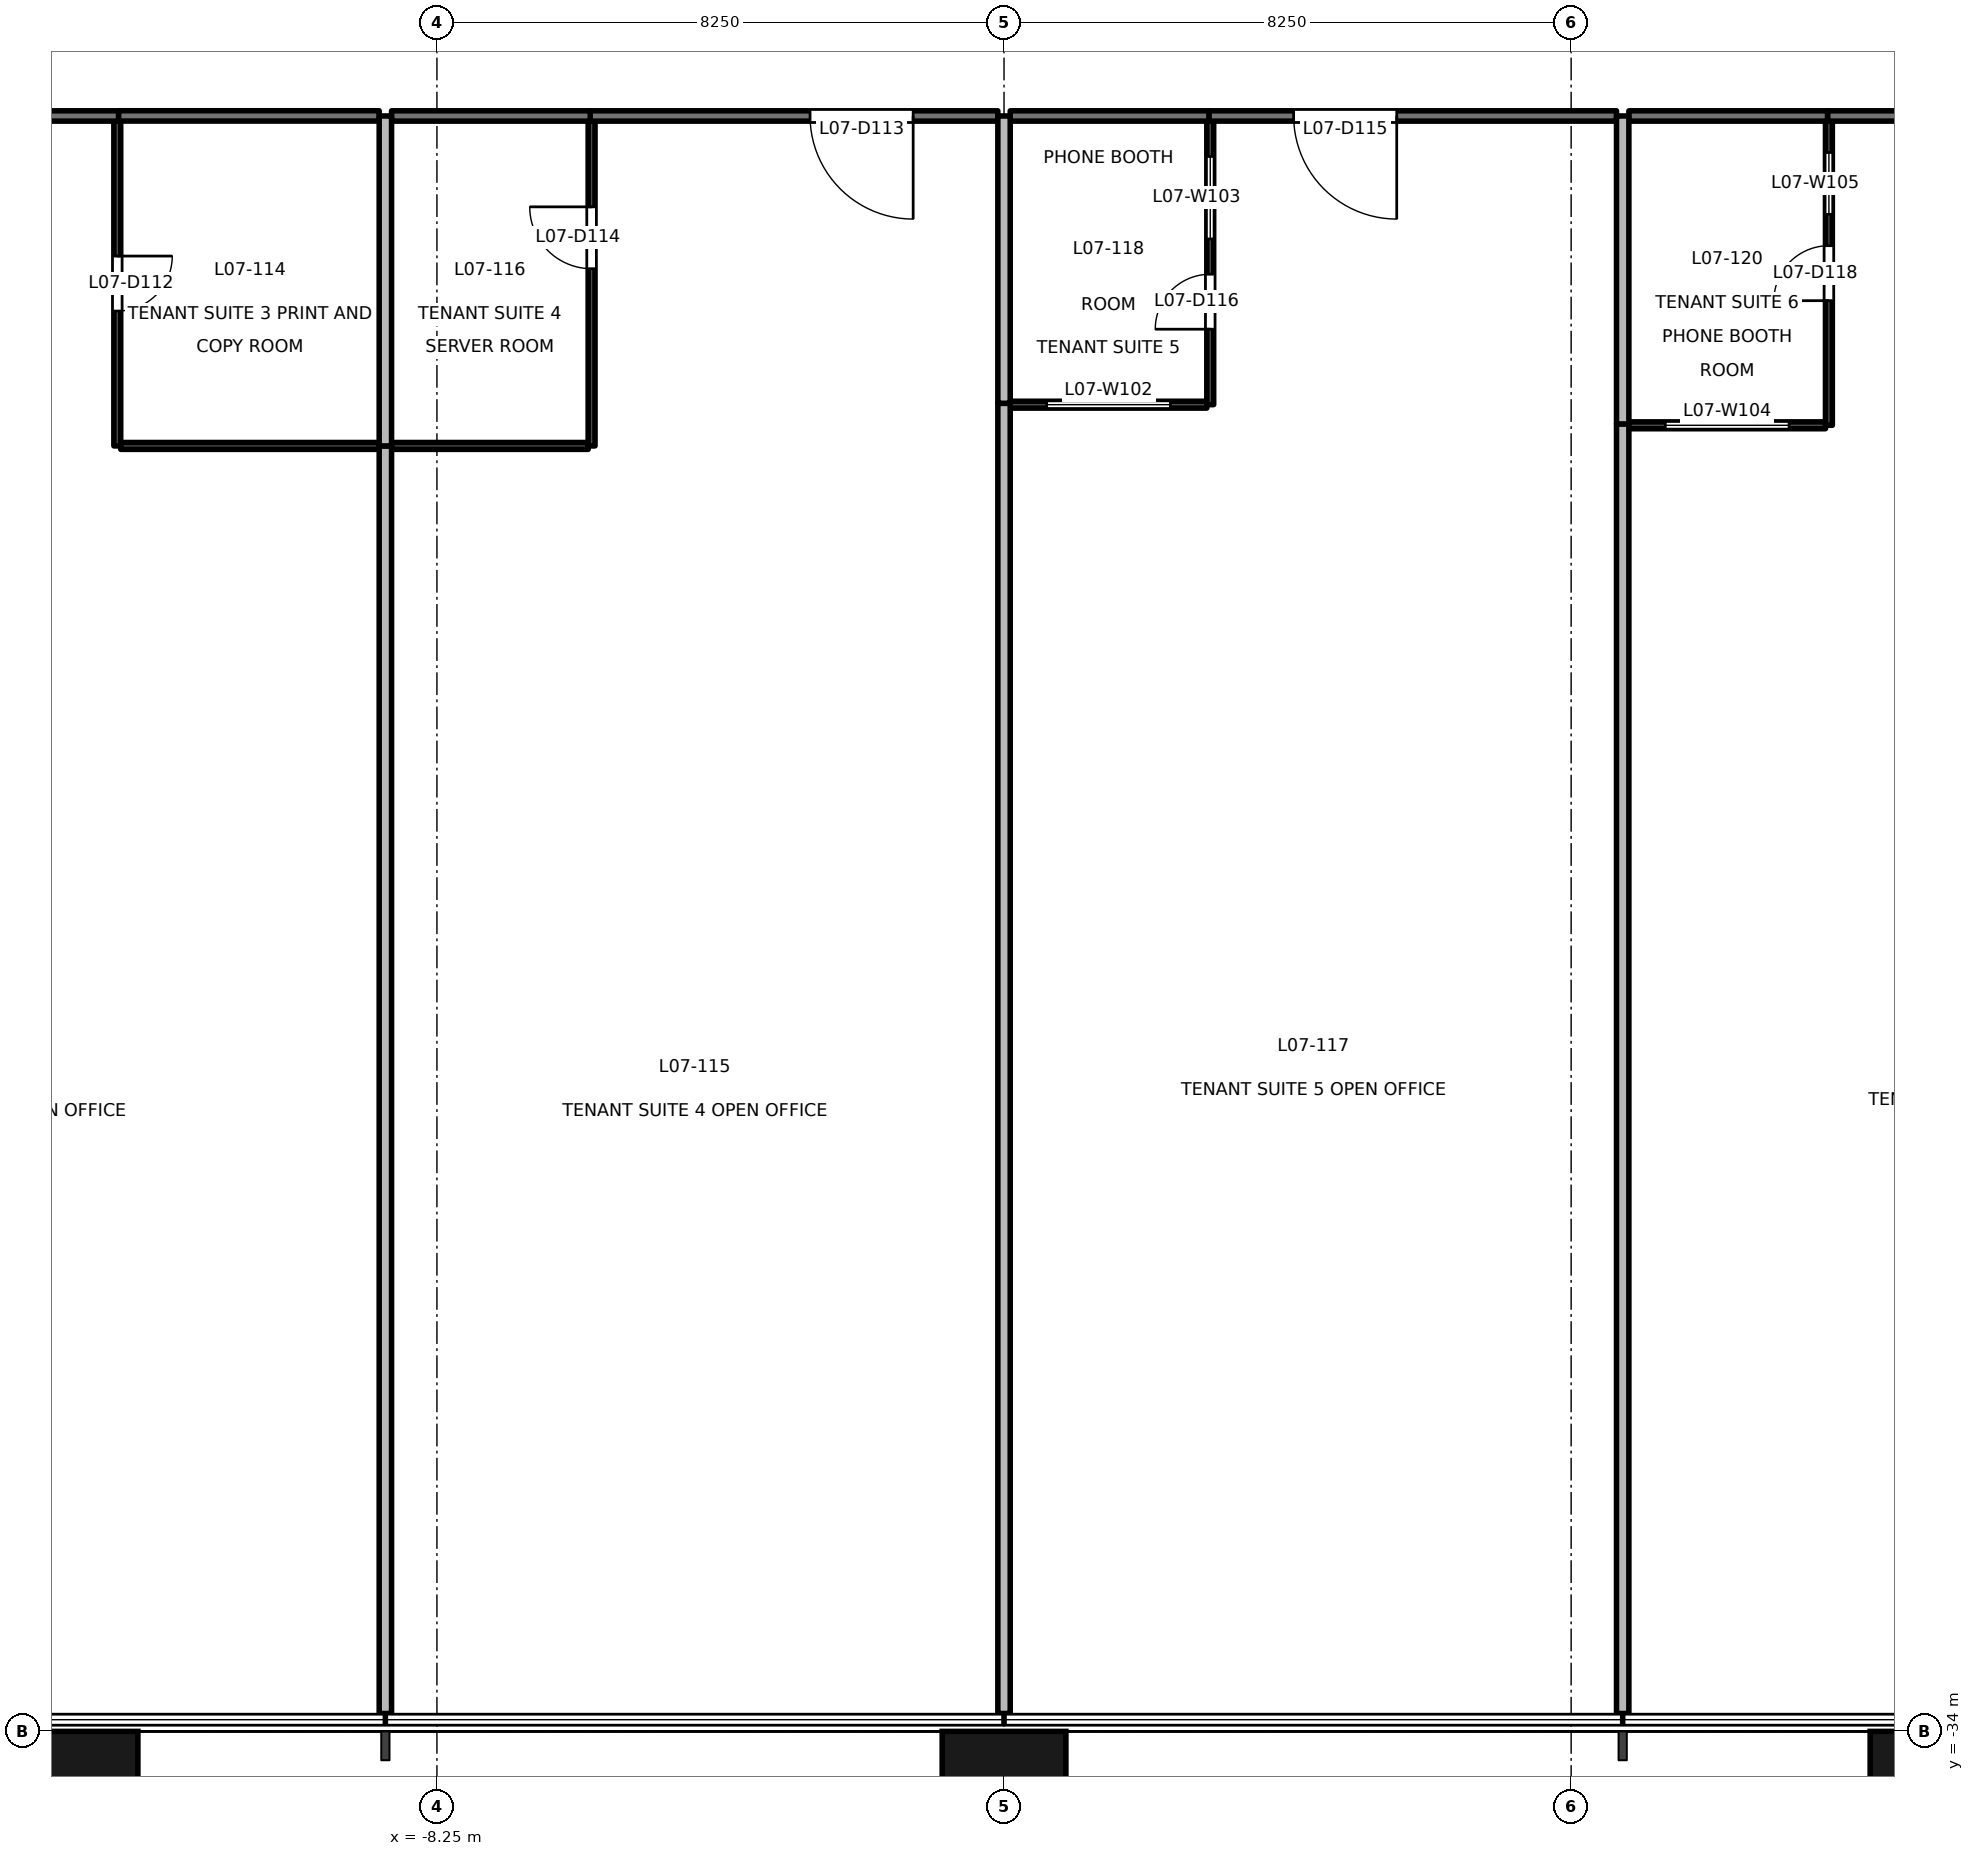
"""IFC4 building model, lengths in metres.
Left out: names, types, materials, properties, quantities, classifications, styles, units other than length and angle.
Written with IfcOpenShell. Run it as: python <this file> out.ifc"""

import sys

from ifc_helpers import new_model, si_unit, direction, frame, frame_2d, origin, origin_2d, place, context, subcontext, project, spatial, rectangle, extrude, element, fill, save


model = new_model("IFC4")
c1 = context("Model", 3, precision=1e-05, world=origin(), true_north=direction((0.0, 1.0)))
c2 = subcontext(c1, "Body", "Model", "MODEL_VIEW")
j1 = project(units=[si_unit("LENGTHUNIT", "METRE"), si_unit("PLANEANGLEUNIT", "RADIAN")], contexts=[c1])
p1 = place(None, origin())
s1 = spatial("IfcSite", under=j1, at=p1, CompositionType="ELEMENT")
p2 = place(p1, origin())
s2 = spatial("IfcBuilding", under=s1, at=p2, CompositionType="ELEMENT")
p3 = place(p2, frame((0.0, 0.0, 36.5)))
s3 = spatial("IfcBuildingStorey", under=s2, at=p3, CompositionType="ELEMENT", Elevation=36.5)
for number, where, z_axis, x_axis in (
    (1, (-13.5, -34.9, -0.2), (0.0, 0.0, 1.0), (1.0, 0.0, 0.0)),
    (2, (0.0, -34.9, -0.2), (0.0, 0.0, 1.0), (1.0, 0.0, 0.0)),
    (3, (13.5, -34.9, -0.2), (0.0, 0.0, 1.0), (1.0, 0.0, 0.0)),
):
    element("IfcColumn", number, at=place(p3, frame(where, z_axis=z_axis, x_axis=x_axis)), inside=s3, PredefinedType="COLUMN", context=c2, shape_type="SweptSolid", body=[
        extrude(rectangle(XDim=1.8, YDim=1.8, at=origin_2d()), origin(), (0.0, 0.0, 1.0), 4.1),
    ])
p4 = place(p3, frame((-12.88, -10.5, 0.0), z_axis=(0.0, 0.0, 1.0), x_axis=(-1.0, 0.0, 0.0)))
e4 = element("IfcWall", 4, at=p4, inside=s3, PredefinedType="PARTITIONING", context=c2, shape_type="SweptSolid", body=[
    extrude(rectangle(XDim=4.54, YDim=0.15, at=frame_2d((2.27, 0.0))), origin(), (0.0, 0.0, 1.0), 2.9),
])
p5 = place(p4, frame((1.93, 0.0, 0.0)))
e5 = element("IfcOpeningElement", 5, at=p5, cuts=e4, PredefinedType="OPENING", context=c2, shape_type="SweptSolid", body=[
    extrude(rectangle(XDim=1.8, YDim=2.1, at=frame_2d((0.9, 1.05))), frame((0.0, 0.085, 0.0), z_axis=(0.0, -1.0, 0.0), x_axis=(1.0, 0.0, 0.0)), (0.0, 0.0, 1.0), 0.171),
])
p6 = place(p3, frame((-9.09, -10.499, 0.0), z_axis=(0.0, 0.0, 1.0), x_axis=(-1.0, 0.0, 0.0)))
e6 = element("IfcWall", 6, at=p6, inside=s3, PredefinedType="PARTITIONING", context=c2, shape_type="SweptSolid", body=[
    extrude(rectangle(XDim=3.79, YDim=0.15, at=frame_2d((1.895, 0.0))), origin(), (0.0, 0.0, 1.0), 2.9),
])
p7 = place(p3, frame((-0.09, -10.5, 0.0), z_axis=(0.0, 0.0, 1.0), x_axis=(-1.0, 0.0, 0.0)))
e7 = element("IfcWall", 7, at=p7, inside=s3, PredefinedType="PARTITIONING", context=c2, shape_type="SweptSolid", body=[
    extrude(rectangle(XDim=5.93, YDim=0.15, at=frame_2d((2.965, 0.0))), origin(), (0.0, 0.0, 1.0), 2.9),
])
p8 = place(p7, frame((1.232, 0.0, 0.0)))
e8 = element("IfcOpeningElement", 8, at=p8, cuts=e7, PredefinedType="OPENING", context=c2, shape_type="SweptSolid", body=[
    extrude(rectangle(XDim=1.5, YDim=2.1, at=frame_2d((0.75, 1.05))), frame((0.0, 0.085, 0.0), z_axis=(0.0, -1.0, 0.0), x_axis=(1.0, 0.0, 0.0)), (0.0, 0.0, 1.0), 0.171),
])
p9 = place(p3, frame((-6.02, -10.5, 0.0), z_axis=(0.0, 0.0, 1.0), x_axis=(-1.0, 0.0, 0.0)))
e9 = element("IfcWall", 9, at=p9, inside=s3, PredefinedType="PARTITIONING", context=c2, shape_type="SweptSolid", body=[
    extrude(rectangle(XDim=2.89, YDim=0.15, at=frame_2d((1.445, 0.0))), origin(), (0.0, 0.0, 1.0), 2.9),
])
p10 = place(p3, frame((8.91, -10.5, 0.0), z_axis=(0.0, 0.0, 1.0), x_axis=(-1.0, 0.0, 0.0)))
e10 = element("IfcWall", 10, at=p10, inside=s3, PredefinedType="PARTITIONING", context=c2, shape_type="SweptSolid", body=[
    extrude(rectangle(XDim=5.93, YDim=0.15, at=frame_2d((2.965, 0.0))), origin(), (0.0, 0.0, 1.0), 2.9),
])
p11 = place(p10, frame((3.197, 0.0, 0.0)))
e11 = element("IfcOpeningElement", 11, at=p11, cuts=e10, PredefinedType="OPENING", context=c2, shape_type="SweptSolid", body=[
    extrude(rectangle(XDim=1.5, YDim=2.1, at=frame_2d((0.75, 1.05))), frame((0.0, 0.085, 0.0), z_axis=(0.0, -1.0, 0.0), x_axis=(1.0, 0.0, 0.0)), (0.0, 0.0, 1.0), 0.171),
])
p12 = place(p3, frame((2.98, -10.5, 0.0), z_axis=(0.0, 0.0, 1.0), x_axis=(-1.0, 0.0, 0.0)))
e12 = element("IfcWall", 12, at=p12, inside=s3, PredefinedType="PARTITIONING", context=c2, shape_type="SweptSolid", body=[
    extrude(rectangle(XDim=2.89, YDim=0.15, at=frame_2d((1.445, 0.0))), origin(), (0.0, 0.0, 1.0), 2.9),
])
p13 = place(p3, frame((15.88, -10.5, 0.0), z_axis=(0.0, 0.0, 1.0), x_axis=(-1.0, 0.0, 0.0)))
e13 = element("IfcWall", 13, at=p13, inside=s3, PredefinedType="PARTITIONING", context=c2, shape_type="SweptSolid", body=[
    extrude(rectangle(XDim=3.9, YDim=0.15, at=frame_2d((1.95, 0.0))), origin(), (0.0, 0.0, 1.0), 2.9),
])
p14 = place(p13, frame((1.05, 0.0, 0.0)))
e14 = element("IfcOpeningElement", 14, at=p14, cuts=e13, PredefinedType="OPENING", context=c2, shape_type="SweptSolid", body=[
    extrude(rectangle(XDim=1.8, YDim=2.1, at=frame_2d((0.9, 1.05))), frame((0.0, 0.085, 0.0), z_axis=(0.0, -1.0, 0.0), x_axis=(1.0, 0.0, 0.0)), (0.0, 0.0, 1.0), 0.171),
])
p15 = place(p3, frame((11.98, -10.5, 0.0), z_axis=(0.0, 0.0, 1.0), x_axis=(-1.0, 0.0, 0.0)))
e15 = element("IfcWall", 15, at=p15, inside=s3, PredefinedType="PARTITIONING", context=c2, shape_type="SweptSolid", body=[
    extrude(rectangle(XDim=2.89, YDim=0.15, at=frame_2d((1.445, 0.0))), origin(), (0.0, 0.0, 1.0), 2.9),
])
p16 = place(p3, frame((-12.9, -10.575, 0.0), z_axis=(0.0, 0.0, 1.0), x_axis=(0.0, -1.0, 0.0)))
e16 = element("IfcWall", 16, at=p16, inside=s3, PredefinedType="PARTITIONING", context=c2, shape_type="SweptSolid", body=[
    extrude(rectangle(XDim=4.725, YDim=0.1, at=frame_2d((2.363, 0.0))), origin(), (0.0, 0.0, 1.0), 3.9),
])
p17 = place(p16, frame((1.963, 0.0, 0.0)))
e17 = element("IfcOpeningElement", 17, at=p17, cuts=e16, PredefinedType="OPENING", context=c2, shape_type="SweptSolid", body=[
    extrude(rectangle(XDim=0.8, YDim=2.1, at=frame_2d((0.4, 1.05))), frame((0.0, 0.061, 0.0), z_axis=(0.0, -1.0, 0.0), x_axis=(1.0, 0.0, 0.0)), (0.0, 0.0, 1.0), 0.121),
])
p18 = place(p3, frame((-12.85, -15.3, 0.0), z_axis=(0.0, 0.0, 1.0), x_axis=(1.0, 0.0, 0.0)))
e18 = element("IfcWall", 18, at=p18, inside=s3, PredefinedType="PARTITIONING", context=c2, shape_type="SweptSolid", body=[
    extrude(rectangle(XDim=3.76, YDim=0.1, at=frame_2d((1.88, 0.0))), origin(), (0.0, 0.0, 1.0), 2.9),
])
p19 = place(p3, frame((-9.0, -15.3, 0.0), z_axis=(0.0, 0.0, 1.0), x_axis=(0.0, -1.0, 0.0)))
e19 = element("IfcWall", 19, at=p19, inside=s3, PredefinedType="PARTITIONING", context=c2, shape_type="SweptSolid", body=[
    extrude(rectangle(XDim=18.44, YDim=0.18, at=frame_2d((9.22, 0.0))), origin(), (0.0, 0.0, 1.0), 2.9),
])
p20 = place(p3, frame((-9.0, -10.5, 0.0), z_axis=(0.0, 0.0, 1.0), x_axis=(0.0, -1.0, 0.0)))
e20 = element("IfcWall", 20, at=p20, inside=s3, PredefinedType="PARTITIONING", context=c2, shape_type="SweptSolid", body=[
    extrude(rectangle(XDim=4.8, YDim=0.18, at=frame_2d((2.4, 0.0))), origin(), (0.0, 0.0, 1.0), 2.9),
])
p21 = place(p3, frame((-8.91, -15.3, 0.0), z_axis=(0.0, 0.0, 1.0), x_axis=(1.0, 0.0, 0.0)))
e21 = element("IfcWall", 21, at=p21, inside=s3, PredefinedType="PARTITIONING", context=c2, shape_type="SweptSolid", body=[
    extrude(rectangle(XDim=2.86, YDim=0.1, at=frame_2d((1.43, 0.0))), origin(), (0.0, 0.0, 1.0), 2.9),
])
p22 = place(p3, frame((-6.0, -15.3, 0.0), z_axis=(0.0, 0.0, 1.0), x_axis=(0.0, 1.0, 0.0)))
e22 = element("IfcWall", 22, at=p22, inside=s3, PredefinedType="PARTITIONING", context=c2, shape_type="SweptSolid", body=[
    extrude(rectangle(XDim=4.725, YDim=0.1, at=frame_2d((2.363, 0.0))), origin(), (0.0, 0.0, 1.0), 3.9),
])
p23 = place(p22, frame((2.578, 0.0, 0.0)))
e23 = element("IfcOpeningElement", 23, at=p23, cuts=e22, PredefinedType="OPENING", context=c2, shape_type="SweptSolid", body=[
    extrude(rectangle(XDim=0.9, YDim=2.1, at=frame_2d((0.45, 1.05))), frame((0.0, 0.061, 0.0), z_axis=(0.0, -1.0, 0.0), x_axis=(1.0, 0.0, 0.0)), (0.0, 0.0, 1.0), 0.121),
])
p24 = place(p3, frame((0.0, -14.68, 0.0), z_axis=(0.0, 0.0, 1.0), x_axis=(0.0, -1.0, 0.0)))
e24 = element("IfcWall", 24, at=p24, inside=s3, PredefinedType="PARTITIONING", context=c2, shape_type="SweptSolid", body=[
    extrude(rectangle(XDim=19.06, YDim=0.18, at=frame_2d((9.53, 0.0))), origin(), (0.0, 0.0, 1.0), 2.9),
])
p25 = place(p3, frame((0.0, -10.5, 0.0), z_axis=(0.0, 0.0, 1.0), x_axis=(0.0, -1.0, 0.0)))
e25 = element("IfcWall", 25, at=p25, inside=s3, PredefinedType="PARTITIONING", context=c2, shape_type="SweptSolid", body=[
    extrude(rectangle(XDim=4.18, YDim=0.18, at=frame_2d((2.09, 0.0))), origin(), (0.0, 0.0, 1.0), 2.9),
])
p26 = place(p3, frame((0.09, -14.7, 0.0), z_axis=(0.0, 0.0, 1.0), x_axis=(1.0, 0.0, 0.0)))
e26 = element("IfcWall", 26, at=p26, inside=s3, PredefinedType="PARTITIONING", context=c2, shape_type="SweptSolid", body=[
    extrude(rectangle(XDim=2.86, YDim=0.1, at=frame_2d((1.43, 0.0))), origin(), (0.0, 0.0, 1.0), 2.9),
])
p27 = place(p26, frame((0.53, 0.0, 0.9)))
e27 = element("IfcOpeningElement", 27, at=p27, cuts=e26, PredefinedType="OPENING", context=c2, shape_type="SweptSolid", body=[
    extrude(rectangle(XDim=1.8, YDim=1.2, at=frame_2d((0.9, 0.6))), frame((0.0, 0.061, 0.0), z_axis=(0.0, -1.0, 0.0), x_axis=(1.0, 0.0, 0.0)), (0.0, 0.0, 1.0), 0.121),
])
p28 = place(p3, frame((3.0, -14.7, 0.0), z_axis=(0.0, 0.0, 1.0), x_axis=(0.0, 1.0, 0.0)))
e28 = element("IfcWall", 28, at=p28, inside=s3, PredefinedType="PARTITIONING", context=c2, shape_type="SweptSolid", body=[
    extrude(rectangle(XDim=4.125, YDim=0.1, at=frame_2d((2.062, 0.0))), origin(), (0.0, 0.0, 1.0), 3.9),
])
p29 = place(p28, frame((1.098, 0.0, 0.0)))
e29 = element("IfcOpeningElement", 29, at=p29, cuts=e28, PredefinedType="OPENING", context=c2, shape_type="SweptSolid", body=[
    extrude(rectangle(XDim=0.8, YDim=2.1, at=frame_2d((0.4, 1.05))), frame((0.0, 0.061, 0.0), z_axis=(0.0, -1.0, 0.0), x_axis=(1.0, 0.0, 0.0)), (0.0, 0.0, 1.0), 0.121),
])
p30 = place(p28, frame((2.411, 0.0, 0.9)))
e30 = element("IfcOpeningElement", 30, at=p30, cuts=e28, PredefinedType="OPENING", context=c2, shape_type="SweptSolid", body=[
    extrude(rectangle(XDim=1.2, YDim=1.2, at=frame_2d((0.6, 0.6))), frame((0.0, 0.061, 0.0), z_axis=(0.0, -1.0, 0.0), x_axis=(1.0, 0.0, 0.0)), (0.0, 0.0, 1.0), 0.121),
])
p31 = place(p3, frame((9.0, -14.98, 0.0), z_axis=(0.0, 0.0, 1.0), x_axis=(0.0, -1.0, 0.0)))
e31 = element("IfcWall", 31, at=p31, inside=s3, PredefinedType="PARTITIONING", context=c2, shape_type="SweptSolid", body=[
    extrude(rectangle(XDim=18.76, YDim=0.18, at=frame_2d((9.38, 0.0))), origin(), (0.0, 0.0, 1.0), 2.9),
])
p32 = place(p3, frame((9.0, -10.5, 0.0), z_axis=(0.0, 0.0, 1.0), x_axis=(0.0, -1.0, 0.0)))
e32 = element("IfcWall", 32, at=p32, inside=s3, PredefinedType="PARTITIONING", context=c2, shape_type="SweptSolid", body=[
    extrude(rectangle(XDim=4.48, YDim=0.18, at=frame_2d((2.24, 0.0))), origin(), (0.0, 0.0, 1.0), 2.9),
])
p33 = place(p3, frame((9.09, -15.0, 0.0), z_axis=(0.0, 0.0, 1.0), x_axis=(1.0, 0.0, 0.0)))
e33 = element("IfcWall", 33, at=p33, inside=s3, PredefinedType="PARTITIONING", context=c2, shape_type="SweptSolid", body=[
    extrude(rectangle(XDim=2.86, YDim=0.1, at=frame_2d((1.43, 0.0))), origin(), (0.0, 0.0, 1.0), 2.9),
])
p34 = place(p33, frame((0.53, 0.0, 0.9)))
e34 = element("IfcOpeningElement", 34, at=p34, cuts=e33, PredefinedType="OPENING", context=c2, shape_type="SweptSolid", body=[
    extrude(rectangle(XDim=1.8, YDim=1.2, at=frame_2d((0.9, 0.6))), frame((0.0, 0.061, 0.0), z_axis=(0.0, -1.0, 0.0), x_axis=(1.0, 0.0, 0.0)), (0.0, 0.0, 1.0), 0.121),
])
p35 = place(p3, frame((12.0, -15.0, 0.0), z_axis=(0.0, 0.0, 1.0), x_axis=(0.0, 1.0, 0.0)))
e35 = element("IfcWall", 35, at=p35, inside=s3, PredefinedType="PARTITIONING", context=c2, shape_type="SweptSolid", body=[
    extrude(rectangle(XDim=4.425, YDim=0.1, at=frame_2d((2.212, 0.0))), origin(), (0.0, 0.0, 1.0), 3.9),
])
p36 = place(p35, frame((1.813, 0.0, 0.0)))
e36 = element("IfcOpeningElement", 36, at=p36, cuts=e35, PredefinedType="OPENING", context=c2, shape_type="SweptSolid", body=[
    extrude(rectangle(XDim=0.8, YDim=2.1, at=frame_2d((0.4, 1.05))), frame((0.0, 0.061, 0.0), z_axis=(0.0, -1.0, 0.0), x_axis=(1.0, 0.0, 0.0)), (0.0, 0.0, 1.0), 0.121),
])
p37 = place(p35, frame((3.069, 0.0, 0.9)))
e37 = element("IfcOpeningElement", 37, at=p37, cuts=e35, PredefinedType="OPENING", context=c2, shape_type="SweptSolid", body=[
    extrude(rectangle(XDim=0.9, YDim=1.2, at=frame_2d((0.45, 0.6))), frame((0.0, 0.061, 0.0), z_axis=(0.0, -1.0, 0.0), x_axis=(1.0, 0.0, 0.0)), (0.0, 0.0, 1.0), 0.121),
])
p38 = place(p17, origin())
e38 = element("IfcDoor", 38, at=p38, inside=s3, OperationType="SINGLE_SWING_LEFT", PredefinedType="DOOR", context=c2, shape_type="SweptSolid", body=[
    extrude(rectangle(XDim=0.8, YDim=2.1, at=frame_2d((0.4, 1.05))), frame((0.0, 0.025, 0.0), z_axis=(0.0, -1.0, 0.0), x_axis=(1.0, 0.0, 0.0)), (0.0, 0.0, 1.0), 0.05),
])
fill(e17, e38)
p39 = place(p8, origin())
e39 = element("IfcDoor", 39, at=p39, inside=s3, OperationType="DOUBLE_DOOR_SINGLE_SWING", PredefinedType="DOOR", context=c2, shape_type="SweptSolid", body=[
    extrude(rectangle(XDim=1.5, YDim=2.1, at=frame_2d((0.75, 1.05))), frame((0.0, 0.025, 0.0), z_axis=(0.0, -1.0, 0.0), x_axis=(1.0, 0.0, 0.0)), (0.0, 0.0, 1.0), 0.05),
])
fill(e8, e39)
p40 = place(p23, origin())
e40 = element("IfcDoor", 40, at=p40, inside=s3, OperationType="SINGLE_SWING_RIGHT", PredefinedType="DOOR", context=c2, shape_type="SweptSolid", body=[
    extrude(rectangle(XDim=0.9, YDim=2.1, at=frame_2d((0.45, 1.05))), frame((0.0, 0.025, 0.0), z_axis=(0.0, -1.0, 0.0), x_axis=(1.0, 0.0, 0.0)), (0.0, 0.0, 1.0), 0.05),
])
fill(e23, e40)
p41 = place(p11, origin())
e41 = element("IfcDoor", 41, at=p41, inside=s3, OperationType="DOUBLE_DOOR_SINGLE_SWING", PredefinedType="DOOR", context=c2, shape_type="SweptSolid", body=[
    extrude(rectangle(XDim=1.5, YDim=2.1, at=frame_2d((0.75, 1.05))), frame((0.0, 0.025, 0.0), z_axis=(0.0, -1.0, 0.0), x_axis=(1.0, 0.0, 0.0)), (0.0, 0.0, 1.0), 0.05),
])
fill(e11, e41)
p42 = place(p29, origin())
e42 = element("IfcDoor", 42, at=p42, inside=s3, OperationType="SINGLE_SWING_LEFT", PredefinedType="DOOR", context=c2, shape_type="SweptSolid", body=[
    extrude(rectangle(XDim=0.8, YDim=2.1, at=frame_2d((0.4, 1.05))), frame((0.0, 0.025, 0.0), z_axis=(0.0, -1.0, 0.0), x_axis=(1.0, 0.0, 0.0)), (0.0, 0.0, 1.0), 0.05),
])
fill(e29, e42)
p43 = place(p36, origin())
e43 = element("IfcDoor", 43, at=p43, inside=s3, OperationType="SINGLE_SWING_LEFT", PredefinedType="DOOR", context=c2, shape_type="SweptSolid", body=[
    extrude(rectangle(XDim=0.8, YDim=2.1, at=frame_2d((0.4, 1.05))), frame((0.0, 0.025, 0.0), z_axis=(0.0, -1.0, 0.0), x_axis=(1.0, 0.0, 0.0)), (0.0, 0.0, 1.0), 0.05),
])
fill(e36, e43)
p44 = place(p27, origin())
e44 = element("IfcWindow", 44, at=p44, inside=s3, PartitioningType="SINGLE_PANEL", PredefinedType="WINDOW", context=c2, shape_type="SweptSolid", body=[
    extrude(rectangle(XDim=1.8, YDim=1.2, at=frame_2d((0.9, 0.6))), frame((0.0, 0.03, 0.0), z_axis=(0.0, -1.0, 0.0), x_axis=(1.0, 0.0, 0.0)), (0.0, 0.0, 1.0), 0.06),
])
fill(e27, e44)
p45 = place(p30, origin())
e45 = element("IfcWindow", 45, at=p45, inside=s3, PartitioningType="SINGLE_PANEL", PredefinedType="WINDOW", context=c2, shape_type="SweptSolid", body=[
    extrude(rectangle(XDim=1.2, YDim=1.2, at=frame_2d((0.6, 0.6))), frame((0.0, 0.03, 0.0), z_axis=(0.0, -1.0, 0.0), x_axis=(1.0, 0.0, 0.0)), (0.0, 0.0, 1.0), 0.06),
])
fill(e30, e45)
p46 = place(p34, origin())
e46 = element("IfcWindow", 46, at=p46, inside=s3, PartitioningType="SINGLE_PANEL", PredefinedType="WINDOW", context=c2, shape_type="SweptSolid", body=[
    extrude(rectangle(XDim=1.8, YDim=1.2, at=frame_2d((0.9, 0.6))), frame((0.0, 0.03, 0.0), z_axis=(0.0, -1.0, 0.0), x_axis=(1.0, 0.0, 0.0)), (0.0, 0.0, 1.0), 0.06),
])
fill(e34, e46)
p47 = place(p37, origin())
e47 = element("IfcWindow", 47, at=p47, inside=s3, PartitioningType="SINGLE_PANEL", PredefinedType="WINDOW", context=c2, shape_type="SweptSolid", body=[
    extrude(rectangle(XDim=0.9, YDim=1.2, at=frame_2d((0.45, 0.6))), frame((0.0, 0.03, 0.0), z_axis=(0.0, -1.0, 0.0), x_axis=(1.0, 0.0, 0.0)), (0.0, 0.0, 1.0), 0.06),
])
fill(e37, e47)
save(model, sys.argv[1])
